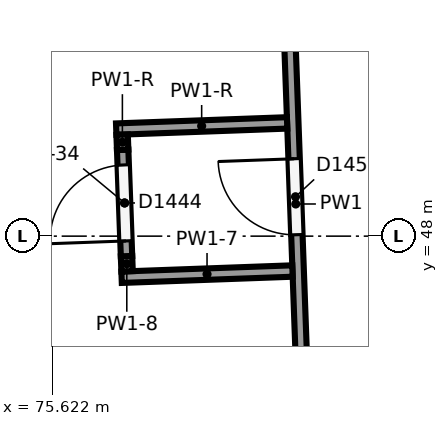
"""IFC4 building model, lengths in metres.
Left out: names, types, materials, properties, quantities, classifications, styles, units other than length and angle.
Written with IfcOpenShell. Run it as: python <this file> out.ifc"""

import sys

from ifc_helpers import new_model, si_unit, direction, frame, frame_2d, origin, place, context, subcontext, project, spatial, rectangle, extrude, element, fill, save


model = new_model("IFC4")
c1 = context("Model", 3, precision=1e-05, world=origin(), true_north=direction((0.0, 1.0)))
c2 = subcontext(c1, "Body", "Model", "MODEL_VIEW")
j1 = project(units=[si_unit("LENGTHUNIT", "METRE"), si_unit("PLANEANGLEUNIT", "RADIAN")], contexts=[c1])
p1 = place(None, origin())
s1 = spatial("IfcSite", under=j1, at=p1, CompositionType="ELEMENT")
p2 = place(p1, origin())
s2 = spatial("IfcBuilding", under=s1, at=p2, CompositionType="ELEMENT")
p3 = place(p2, frame((0.0, 0.0, 18.0)))
s3 = spatial("IfcBuildingStorey", under=s2, at=p3, CompositionType="ELEMENT", Elevation=18.0)
p4 = place(p3, frame((78.967, 44.571, 0.0), z_axis=(0.0, 0.0, 1.0), x_axis=(-0.036322942596, 0.999340104189, 0.0)))
e1 = element("IfcWall", 1, at=p4, inside=s3, PredefinedType="PARTITIONING", context=c2, shape_type="SweptSolid", body=[
    extrude(rectangle(XDim=7.709, YDim=0.15, at=frame_2d((3.855, 0.0))), origin(), (0.0, 0.0, 1.0), 5.6),
])
p5 = place(p4, frame((3.45, 0.0, 0.0)))
e2 = element("IfcOpeningElement", 2, at=p5, cuts=e1, PredefinedType="OPENING", context=c2, shape_type="SweptSolid", body=[
    extrude(rectangle(XDim=1.0, YDim=2.1, at=frame_2d((0.5, 1.05))), frame((0.0, 0.085, 0.0), z_axis=(0.0, -1.0, 0.0), x_axis=(1.0, 0.0, 0.0)), (0.0, 0.0, 1.0), 0.17),
])
p6 = place(p3, frame((78.784, 47.541, 0.0), z_axis=(0.0, 0.0, 1.0), x_axis=(-0.999343075339, -0.036241106098, 0.0)))
e3 = element("IfcWall", 3, at=p6, inside=s3, PredefinedType="PARTITIONING", context=c2, shape_type="SweptSolid", body=[
    extrude(rectangle(XDim=2.25, YDim=0.15, at=frame_2d((1.125, 0.0))), origin(), (0.0, 0.0, 1.0), 5.618),
])
p7 = place(p3, frame((78.713, 49.49, 0.0), z_axis=(0.0, 0.0, 1.0), x_axis=(-0.999343075339, -0.036241106098, 0.0)))
e4 = element("IfcWall", 4, at=p7, inside=s3, PredefinedType="PARTITIONING", context=c2, shape_type="SweptSolid", body=[
    extrude(rectangle(XDim=2.25, YDim=0.15, at=frame_2d((1.125, 0.0))), origin(), (0.0, 0.0, 1.0), 5.716),
])
p8 = place(p3, frame((76.607, 47.537, 0.0), z_axis=(0.0, 0.0, 1.0), x_axis=(-0.036650176892, 0.99932815658, 0.0)))
e5 = element("IfcWall", 5, at=p8, inside=s3, PredefinedType="PARTITIONING", context=c2, shape_type="SweptSolid", body=[
    extrude(rectangle(XDim=0.2, YDim=0.15, at=frame_2d((0.1, 0.0))), origin(), (0.0, 0.0, 1.0), 5.669),
])
p9 = place(p3, frame((76.6, 47.737, 0.0), z_axis=(0.0, 0.0, 1.0), x_axis=(-0.036269960205, 0.99934202853, 0.0)))
e6 = element("IfcWall", 6, at=p9, inside=s3, PredefinedType="PARTITIONING", context=c2, shape_type="SweptSolid", body=[
    extrude(rectangle(XDim=1.4, YDim=0.15, at=frame_2d((0.7, 0.0))), origin(), (0.0, 0.0, 1.0), 5.679),
])
p10 = place(p9, frame((0.2, 0.0, 0.0)))
e7 = element("IfcOpeningElement", 7, at=p10, cuts=e6, PredefinedType="OPENING", context=c2, shape_type="SweptSolid", body=[
    extrude(rectangle(XDim=1.0, YDim=2.1, at=frame_2d((0.5, 1.05))), frame((0.0, 0.085, 0.0), z_axis=(0.0, -1.0, 0.0), x_axis=(1.0, 0.0, 0.0)), (0.0, 0.0, 1.0), 0.17),
])
p11 = place(p3, frame((76.549, 49.136, 0.0), z_axis=(0.0, 0.0, 1.0), x_axis=(-0.036605486981, 0.999329794574, 0.0)))
e8 = element("IfcWall", 8, at=p11, inside=s3, PredefinedType="PARTITIONING", context=c2, shape_type="SweptSolid", body=[
    extrude(rectangle(XDim=0.2, YDim=0.15, at=frame_2d((0.1, 0.0))), origin(), (0.0, 0.0, 1.0), 5.716),
])
p12 = place(p5, origin())
e9 = element("IfcDoor", 9, at=p12, inside=s3, OperationType="SINGLE_SWING_RIGHT", PredefinedType="DOOR", context=c2, shape_type="SweptSolid", body=[
    extrude(rectangle(XDim=1.0, YDim=2.1, at=frame_2d((0.5, 1.05))), frame((0.0, 0.025, 0.0), z_axis=(0.0, -1.0, 0.0), x_axis=(1.0, 0.0, 0.0)), (0.0, 0.0, 1.0), 0.05),
])
fill(e2, e9)
p13 = place(p10, origin())
e10 = element("IfcDoor", 10, at=p13, inside=s3, OperationType="SINGLE_SWING_LEFT", PredefinedType="DOOR", context=c2, shape_type="SweptSolid", body=[
    extrude(rectangle(XDim=1.0, YDim=2.1, at=frame_2d((0.5, 1.05))), frame((0.0, 0.025, 0.0), z_axis=(0.0, -1.0, 0.0), x_axis=(1.0, 0.0, 0.0)), (0.0, 0.0, 1.0), 0.05),
])
fill(e7, e10)
save(model, sys.argv[1])
